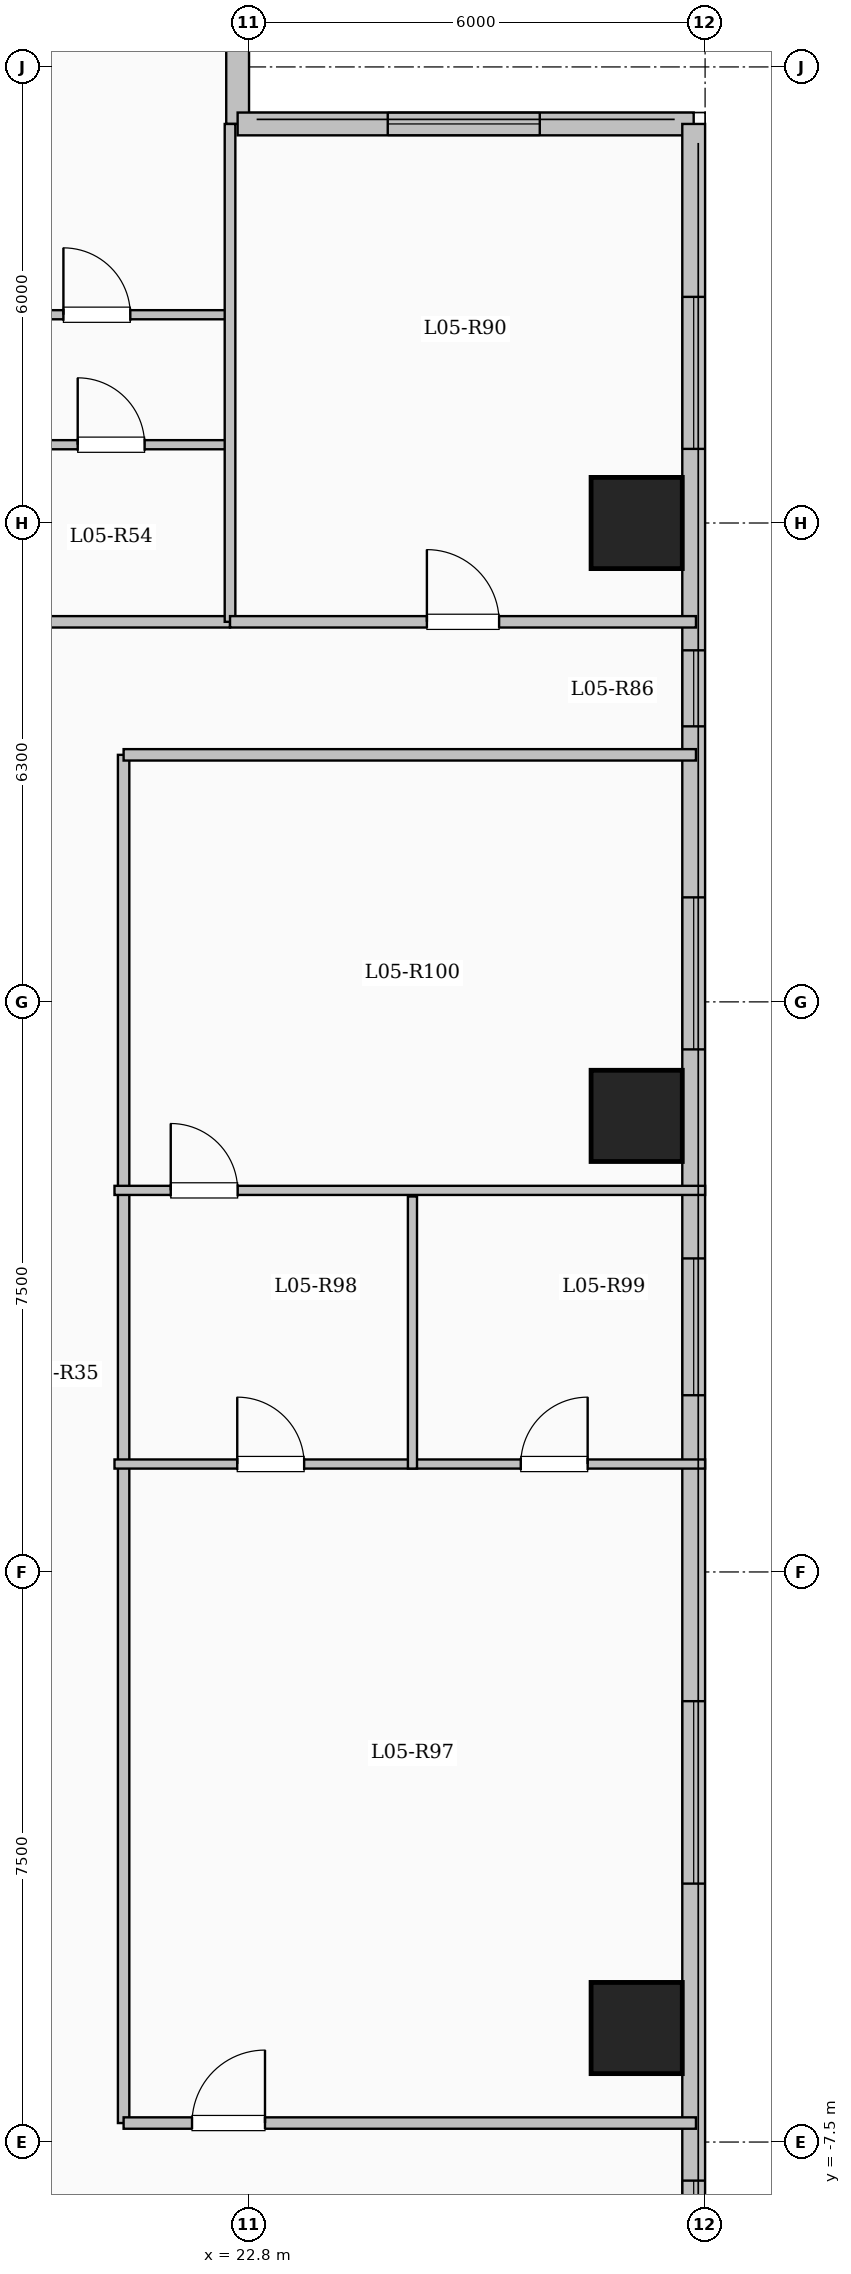
"""IFC4 building model, lengths in metres.
Left out: names, types, materials, properties, quantities, classifications, styles, units other than length and angle.
Written with IfcOpenShell. Run it as: python <this file> out.ifc"""

import sys

from ifc_helpers import new_model, si_unit, direction, frame, frame_2d, origin, origin_2d, place, context, subcontext, project, spatial, rectangle, extrude, element, fill, save


model = new_model("IFC4")
c1 = context("Model", 3, precision=1e-05, world=origin(), true_north=direction((0.0, 1.0)))
c2 = subcontext(c1, "Body", "Model", "MODEL_VIEW")
j1 = project(units=[si_unit("LENGTHUNIT", "METRE"), si_unit("PLANEANGLEUNIT", "RADIAN")], contexts=[c1])
p1 = place(None, origin())
s1 = spatial("IfcSite", under=j1, at=p1, CompositionType="ELEMENT")
p2 = place(p1, origin())
s2 = spatial("IfcBuilding", under=s1, at=p2, CompositionType="ELEMENT")
p3 = place(p2, frame((0.0, 0.0, 24.0)))
s3 = spatial("IfcBuildingStorey", under=s2, at=p3, CompositionType="ELEMENT", Elevation=24.0)
for number, where, z_axis, x_axis in (
    (1, (27.9, -6.0, 0.0), (0.0, 0.0, 1.0), (1.0, 0.0, 0.0)),
    (2, (27.9, 6.0, 0.0), (0.0, 0.0, 1.0), (1.0, 0.0, 0.0)),
    (3, (27.9, 13.8, 0.0), (0.0, 0.0, 1.0), (1.0, 0.0, 0.0)),
):
    element("IfcColumn", number, at=place(p3, frame(where, z_axis=z_axis, x_axis=x_axis)), inside=s3, PredefinedType="COLUMN", context=c2, shape_type="SweptSolid", body=[
        extrude(rectangle(XDim=1.2, YDim=1.2, at=origin_2d()), origin(), (0.0, 0.0, 1.0), 3.35),
    ])
p4 = place(p3, frame((22.65, 23.55, 0.0), z_axis=(0.0, 0.0, 1.0), x_axis=(0.0, -1.0, 0.0)))
e4 = element("IfcWall", 4, at=p4, inside=s3, PredefinedType="SOLIDWALL", context=c2, shape_type="SweptSolid", body=[
    extrude(rectangle(XDim=4.5, YDim=0.3, at=frame_2d((2.25, 0.0))), origin(), (0.0, 0.0, 1.0), 3.1),
])
p5 = place(p4, frame((1.367, 0.0, 0.9)))
e5 = element("IfcOpeningElement", 5, at=p5, cuts=e4, PredefinedType="OPENING", context=c2, shape_type="SweptSolid", body=[
    extrude(rectangle(XDim=1.8, YDim=1.65, at=frame_2d((0.9, 0.825))), frame((0.0, 0.16, 0.0), z_axis=(0.0, -1.0, 0.0), x_axis=(1.0, 0.0, 0.0)), (0.0, 0.0, 1.0), 0.32),
])
p6 = place(p3, frame((22.65, 19.05, 0.0), z_axis=(0.0, 0.0, 1.0), x_axis=(1.0, 0.0, 0.0)))
e6 = element("IfcWall", 6, at=p6, inside=s3, PredefinedType="SOLIDWALL", context=c2, shape_type="SweptSolid", body=[
    extrude(rectangle(XDim=6.0, YDim=0.3, at=frame_2d((3.0, 0.0))), origin(), (0.0, 0.0, 1.0), 3.1),
])
p7 = place(p6, frame((1.975, 0.0, 0.9)))
e7 = element("IfcOpeningElement", 7, at=p7, cuts=e6, PredefinedType="OPENING", context=c2, shape_type="SweptSolid", body=[
    extrude(rectangle(XDim=2.0, YDim=1.7, at=frame_2d((1.0, 0.85))), frame((0.0, 0.16, 0.0), z_axis=(0.0, -1.0, 0.0), x_axis=(1.0, 0.0, 0.0)), (0.0, 0.0, 1.0), 0.32),
])
p8 = place(p3, frame((28.65, 19.05, 0.0), z_axis=(0.0, 0.0, 1.0), x_axis=(0.0, -1.0, 0.0)))
e8 = element("IfcWall", 8, at=p8, inside=s3, PredefinedType="SOLIDWALL", context=c2, shape_type="SweptSolid", body=[
    extrude(rectangle(XDim=38.1, YDim=0.3, at=frame_2d((19.05, 0.0))), origin(), (0.0, 0.0, 1.0), 3.1),
])
p9 = place(p8, frame((2.275, 0.0, 0.9)))
e9 = element("IfcOpeningElement", 9, at=p9, cuts=e8, PredefinedType="OPENING", context=c2, shape_type="SweptSolid", body=[
    extrude(rectangle(XDim=2.0, YDim=1.7, at=frame_2d((1.0, 0.85))), frame((0.0, 0.16, 0.0), z_axis=(0.0, -1.0, 0.0), x_axis=(1.0, 0.0, 0.0)), (0.0, 0.0, 1.0), 0.32),
])
p10 = place(p8, frame((6.925, 0.0, 0.95)))
e10 = element("IfcOpeningElement", 10, at=p10, cuts=e8, PredefinedType="OPENING", context=c2, shape_type="SweptSolid", body=[
    extrude(rectangle(XDim=1.0, YDim=1.5, at=frame_2d((0.5, 0.75))), frame((0.0, 0.16, 0.0), z_axis=(0.0, -1.0, 0.0), x_axis=(1.0, 0.0, 0.0)), (0.0, 0.0, 1.0), 0.32),
])
p11 = place(p8, frame((10.175, 0.0, 0.9)))
e11 = element("IfcOpeningElement", 11, at=p11, cuts=e8, PredefinedType="OPENING", context=c2, shape_type="SweptSolid", body=[
    extrude(rectangle(XDim=2.0, YDim=1.7, at=frame_2d((1.0, 0.85))), frame((0.0, 0.16, 0.0), z_axis=(0.0, -1.0, 0.0), x_axis=(1.0, 0.0, 0.0)), (0.0, 0.0, 1.0), 0.32),
])
p12 = place(p8, frame((14.925, 0.0, 0.9)))
e12 = element("IfcOpeningElement", 12, at=p12, cuts=e8, PredefinedType="OPENING", context=c2, shape_type="SweptSolid", body=[
    extrude(rectangle(XDim=1.8, YDim=1.65, at=frame_2d((0.9, 0.825))), frame((0.0, 0.16, 0.0), z_axis=(0.0, -1.0, 0.0), x_axis=(1.0, 0.0, 0.0)), (0.0, 0.0, 1.0), 0.32),
])
p13 = place(p8, frame((20.75, 0.0, 0.9)))
e13 = element("IfcOpeningElement", 13, at=p13, cuts=e8, PredefinedType="OPENING", context=c2, shape_type="SweptSolid", body=[
    extrude(rectangle(XDim=2.4, YDim=1.8, at=frame_2d((1.2, 0.9))), frame((0.0, 0.16, 0.0), z_axis=(0.0, -1.0, 0.0), x_axis=(1.0, 0.0, 0.0)), (0.0, 0.0, 1.0), 0.32),
])
p14 = place(p8, frame((27.058, 0.0, 0.9)))
e14 = element("IfcOpeningElement", 14, at=p14, cuts=e8, PredefinedType="OPENING", context=c2, shape_type="SweptSolid", body=[
    extrude(rectangle(XDim=1.5, YDim=1.65, at=frame_2d((0.75, 0.825))), frame((0.0, 0.16, 0.0), z_axis=(0.0, -1.0, 0.0), x_axis=(1.0, 0.0, 0.0)), (0.0, 0.0, 1.0), 0.32),
])
p15 = place(p8, frame((32.55, 0.0, 0.9)))
e15 = element("IfcOpeningElement", 15, at=p15, cuts=e8, PredefinedType="OPENING", context=c2, shape_type="SweptSolid", body=[
    extrude(rectangle(XDim=2.4, YDim=1.8, at=frame_2d((1.2, 0.9))), frame((0.0, 0.16, 0.0), z_axis=(0.0, -1.0, 0.0), x_axis=(1.0, 0.0, 0.0)), (0.0, 0.0, 1.0), 0.32),
])
p16 = place(p3, frame((3.85, 12.5, 0.0), z_axis=(0.0, 0.0, 1.0), x_axis=(1.0, 0.0, 0.0)))
e16 = element("IfcWall", 16, at=p16, inside=s3, PredefinedType="PARTITIONING", context=c2, shape_type="SweptSolid", body=[
    extrude(rectangle(XDim=18.7, YDim=0.15, at=frame_2d((9.35, 0.0))), origin(), (0.0, 0.0, 1.0), 3.1),
])
p17 = place(p16, frame((0.7, 0.0, 0.0)))
e17 = element("IfcOpeningElement", 17, at=p17, cuts=e16, PredefinedType="OPENING", context=c2, shape_type="SweptSolid", body=[
    extrude(rectangle(XDim=0.96, YDim=2.15, at=frame_2d((0.48, 1.075))), frame((0.0, 0.085, 0.0), z_axis=(0.0, -1.0, 0.0), x_axis=(1.0, 0.0, 0.0)), (0.0, 0.0, 1.0), 0.17),
])
p18 = place(p16, frame((8.4, 0.0, 0.0)))
e18 = element("IfcOpeningElement", 18, at=p18, cuts=e16, PredefinedType="OPENING", context=c2, shape_type="SweptSolid", body=[
    extrude(rectangle(XDim=0.96, YDim=2.15, at=frame_2d((0.48, 1.075))), frame((0.0, 0.085, 0.0), z_axis=(0.0, -1.0, 0.0), x_axis=(1.0, 0.0, 0.0)), (0.0, 0.0, 1.0), 0.17),
])
p19 = place(p3, frame((21.15, -7.25, 0.0), z_axis=(0.0, 0.0, 1.0), x_axis=(0.0, 1.0, 0.0)))
e19 = element("IfcWall", 19, at=p19, inside=s3, PredefinedType="PARTITIONING", context=c2, shape_type="SweptSolid", body=[
    extrude(rectangle(XDim=18.0, YDim=0.15, at=frame_2d((9.0, 0.0))), origin(), (0.0, 0.0, 1.0), 2.585),
])
p20 = place(p3, frame((19.422, 14.83, 0.0), z_axis=(0.0, 0.0, 1.0), x_axis=(1.0, 0.0, 0.0)))
e20 = element("IfcWall", 20, at=p20, inside=s3, PredefinedType="PARTITIONING", context=c2, shape_type="SweptSolid", body=[
    extrude(rectangle(XDim=3.128, YDim=0.12, at=frame_2d((1.564, 0.0))), origin(), (0.0, 0.0, 1.0), 3.1),
])
p21 = place(p20, frame((1.124, 0.0, 0.0)))
e21 = element("IfcOpeningElement", 21, at=p21, cuts=e20, PredefinedType="OPENING", context=c2, shape_type="SweptSolid", body=[
    extrude(rectangle(XDim=0.88, YDim=2.1, at=frame_2d((0.44, 1.05))), frame((0.0, 0.07, 0.0), z_axis=(0.0, -1.0, 0.0), x_axis=(1.0, 0.0, 0.0)), (0.0, 0.0, 1.0), 0.14),
])
p22 = place(p3, frame((15.902, 16.54, 0.0), z_axis=(0.0, 0.0, 1.0), x_axis=(1.0, 0.0, 0.0)))
e22 = element("IfcWall", 22, at=p22, inside=s3, PredefinedType="PARTITIONING", context=c2, shape_type="SweptSolid", body=[
    extrude(rectangle(XDim=6.708, YDim=0.12, at=frame_2d((3.354, 0.0))), origin(), (0.0, 0.0, 1.0), 3.1),
])
p23 = place(p22, frame((1.192, 0.0, 0.0)))
e23 = element("IfcOpeningElement", 23, at=p23, cuts=e22, PredefinedType="OPENING", context=c2, shape_type="SweptSolid", body=[
    extrude(rectangle(XDim=0.88, YDim=2.1, at=frame_2d((0.44, 1.05))), frame((0.0, 0.07, 0.0), z_axis=(0.0, -1.0, 0.0), x_axis=(1.0, 0.0, 0.0)), (0.0, 0.0, 1.0), 0.14),
])
p24 = place(p22, frame((4.456, 0.0, 0.0)))
e24 = element("IfcOpeningElement", 24, at=p24, cuts=e22, PredefinedType="OPENING", context=c2, shape_type="SweptSolid", body=[
    extrude(rectangle(XDim=0.88, YDim=2.1, at=frame_2d((0.44, 1.05))), frame((0.0, 0.07, 0.0), z_axis=(0.0, -1.0, 0.0), x_axis=(1.0, 0.0, 0.0)), (0.0, 0.0, 1.0), 0.14),
])
p25 = place(p3, frame((21.15, -7.25, 0.0), z_axis=(0.0, 0.0, 1.0), x_axis=(1.0, 0.0, 0.0)))
e25 = element("IfcWall", 25, at=p25, inside=s3, PredefinedType="PARTITIONING", context=c2, shape_type="SweptSolid", body=[
    extrude(rectangle(XDim=7.53, YDim=0.15, at=frame_2d((3.765, 0.0))), origin(), (0.0, 0.0, 1.0), 3.1),
])
p26 = place(p25, frame((0.9, 0.0, 0.0)))
e26 = element("IfcOpeningElement", 26, at=p26, cuts=e25, PredefinedType="OPENING", context=c2, shape_type="SweptSolid", body=[
    extrude(rectangle(XDim=0.96, YDim=2.15, at=frame_2d((0.48, 1.075))), frame((0.0, 0.085, 0.0), z_axis=(0.0, -1.0, 0.0), x_axis=(1.0, 0.0, 0.0)), (0.0, 0.0, 1.0), 0.17),
])
p27 = place(p3, frame((21.15, 10.75, 0.0), z_axis=(0.0, 0.0, 1.0), x_axis=(1.0, 0.0, 0.0)))
e27 = element("IfcWall", 27, at=p27, inside=s3, PredefinedType="PARTITIONING", context=c2, shape_type="SweptSolid", body=[
    extrude(rectangle(XDim=7.53, YDim=0.15, at=frame_2d((3.765, 0.0))), origin(), (0.0, 0.0, 1.0), 3.1),
])
p28 = place(p3, frame((22.55, 12.5, 0.0), z_axis=(0.0, 0.0, 1.0), x_axis=(0.0, 1.0, 0.0)))
e28 = element("IfcWall", 28, at=p28, inside=s3, PredefinedType="PARTITIONING", context=c2, shape_type="SweptSolid", body=[
    extrude(rectangle(XDim=6.55, YDim=0.14, at=frame_2d((3.275, 0.0))), origin(), (0.0, 0.0, 1.0), 3.1),
])
p29 = place(p3, frame((22.55, 12.5, 0.0), z_axis=(0.0, 0.0, 1.0), x_axis=(1.0, 0.0, 0.0)))
e29 = element("IfcWall", 29, at=p29, inside=s3, PredefinedType="PARTITIONING", context=c2, shape_type="SweptSolid", body=[
    extrude(rectangle(XDim=6.13, YDim=0.15, at=frame_2d((3.065, 0.0))), origin(), (0.0, 0.0, 1.0), 3.1),
])
p30 = place(p29, frame((2.59, 0.0, 0.0)))
e30 = element("IfcOpeningElement", 30, at=p30, cuts=e29, PredefinedType="OPENING", context=c2, shape_type="SweptSolid", body=[
    extrude(rectangle(XDim=0.95, YDim=2.15, at=frame_2d((0.475, 1.075))), frame((0.0, 0.085, 0.0), z_axis=(0.0, -1.0, 0.0), x_axis=(1.0, 0.0, 0.0)), (0.0, 0.0, 1.0), 0.17),
])
p31 = place(p3, frame((21.03, 1.42, 0.0), z_axis=(0.0, 0.0, 1.0), x_axis=(1.0, 0.0, 0.0)))
e31 = element("IfcWall", 31, at=p31, inside=s3, PredefinedType="PARTITIONING", context=c2, shape_type="SweptSolid", body=[
    extrude(rectangle(XDim=7.77, YDim=0.12, at=frame_2d((3.885, 0.0))), origin(), (0.0, 0.0, 1.0), 3.1),
])
p32 = place(p31, frame((1.615, 0.0, 0.0)))
e32 = element("IfcOpeningElement", 32, at=p32, cuts=e31, PredefinedType="OPENING", context=c2, shape_type="SweptSolid", body=[
    extrude(rectangle(XDim=0.88, YDim=2.1, at=frame_2d((0.44, 1.05))), frame((0.0, 0.07, 0.0), z_axis=(0.0, -1.0, 0.0), x_axis=(1.0, 0.0, 0.0)), (0.0, 0.0, 1.0), 0.14),
])
p33 = place(p31, frame((5.345, 0.0, 0.0)))
e33 = element("IfcOpeningElement", 33, at=p33, cuts=e31, PredefinedType="OPENING", context=c2, shape_type="SweptSolid", body=[
    extrude(rectangle(XDim=0.88, YDim=2.1, at=frame_2d((0.44, 1.05))), frame((0.0, 0.07, 0.0), z_axis=(0.0, -1.0, 0.0), x_axis=(1.0, 0.0, 0.0)), (0.0, 0.0, 1.0), 0.14),
])
p34 = place(p3, frame((21.03, 5.02, 0.0), z_axis=(0.0, 0.0, 1.0), x_axis=(1.0, 0.0, 0.0)))
e34 = element("IfcWall", 34, at=p34, inside=s3, PredefinedType="PARTITIONING", context=c2, shape_type="SweptSolid", body=[
    extrude(rectangle(XDim=7.77, YDim=0.12, at=frame_2d((3.885, 0.0))), origin(), (0.0, 0.0, 1.0), 3.1),
])
p35 = place(p34, frame((0.74, 0.0, 0.0)))
e35 = element("IfcOpeningElement", 35, at=p35, cuts=e34, PredefinedType="OPENING", context=c2, shape_type="SweptSolid", body=[
    extrude(rectangle(XDim=0.88, YDim=2.1, at=frame_2d((0.44, 1.05))), frame((0.0, 0.07, 0.0), z_axis=(0.0, -1.0, 0.0), x_axis=(1.0, 0.0, 0.0)), (0.0, 0.0, 1.0), 0.14),
])
p36 = place(p3, frame((24.95, 1.36, 0.0), z_axis=(0.0, 0.0, 1.0), x_axis=(0.0, 1.0, 0.0)))
e36 = element("IfcWall", 36, at=p36, inside=s3, PredefinedType="PARTITIONING", context=c2, shape_type="SweptSolid", body=[
    extrude(rectangle(XDim=3.58, YDim=0.12, at=frame_2d((1.79, 0.0))), origin(), (0.0, 0.0, 1.0), 3.1),
])
p37 = place(p7, origin())
e37 = element("IfcWindow", 37, at=p37, inside=s3, PartitioningType="SINGLE_PANEL", PredefinedType="WINDOW", context=c2, shape_type="SweptSolid", body=[
    extrude(rectangle(XDim=2.0, YDim=1.7, at=frame_2d((1.0, 0.85))), frame((0.0, 0.03, 0.0), z_axis=(0.0, -1.0, 0.0), x_axis=(1.0, 0.0, 0.0)), (0.0, 0.0, 1.0), 0.06),
])
fill(e7, e37)
p38 = place(p9, origin())
e38 = element("IfcWindow", 38, at=p38, inside=s3, PartitioningType="SINGLE_PANEL", PredefinedType="WINDOW", context=c2, shape_type="SweptSolid", body=[
    extrude(rectangle(XDim=2.0, YDim=1.7, at=frame_2d((1.0, 0.85))), frame((0.0, 0.03, 0.0), z_axis=(0.0, -1.0, 0.0), x_axis=(1.0, 0.0, 0.0)), (0.0, 0.0, 1.0), 0.06),
])
fill(e9, e38)
p39 = place(p10, origin())
e39 = element("IfcWindow", 39, at=p39, inside=s3, PartitioningType="SINGLE_PANEL", PredefinedType="WINDOW", context=c2, shape_type="SweptSolid", body=[
    extrude(rectangle(XDim=1.0, YDim=1.5, at=frame_2d((0.5, 0.75))), frame((0.0, 0.03, 0.0), z_axis=(0.0, -1.0, 0.0), x_axis=(1.0, 0.0, 0.0)), (0.0, 0.0, 1.0), 0.06),
])
fill(e10, e39)
p40 = place(p11, origin())
e40 = element("IfcWindow", 40, at=p40, inside=s3, PartitioningType="SINGLE_PANEL", PredefinedType="WINDOW", context=c2, shape_type="SweptSolid", body=[
    extrude(rectangle(XDim=2.0, YDim=1.7, at=frame_2d((1.0, 0.85))), frame((0.0, 0.03, 0.0), z_axis=(0.0, -1.0, 0.0), x_axis=(1.0, 0.0, 0.0)), (0.0, 0.0, 1.0), 0.06),
])
fill(e11, e40)
p41 = place(p12, origin())
e41 = element("IfcWindow", 41, at=p41, inside=s3, PartitioningType="SINGLE_PANEL", PredefinedType="WINDOW", context=c2, shape_type="SweptSolid", body=[
    extrude(rectangle(XDim=1.8, YDim=1.65, at=frame_2d((0.9, 0.825))), frame((0.0, 0.03, 0.0), z_axis=(0.0, -1.0, 0.0), x_axis=(1.0, 0.0, 0.0)), (0.0, 0.0, 1.0), 0.06),
])
fill(e12, e41)
p42 = place(p13, origin())
e42 = element("IfcWindow", 42, at=p42, inside=s3, PartitioningType="SINGLE_PANEL", PredefinedType="WINDOW", context=c2, shape_type="SweptSolid", body=[
    extrude(rectangle(XDim=2.4, YDim=1.8, at=frame_2d((1.2, 0.9))), frame((0.0, 0.03, 0.0), z_axis=(0.0, -1.0, 0.0), x_axis=(1.0, 0.0, 0.0)), (0.0, 0.0, 1.0), 0.06),
])
fill(e13, e42)
p43 = place(p14, origin())
e43 = element("IfcWindow", 43, at=p43, inside=s3, PartitioningType="SINGLE_PANEL", PredefinedType="WINDOW", context=c2, shape_type="SweptSolid", body=[
    extrude(rectangle(XDim=1.5, YDim=1.65, at=frame_2d((0.75, 0.825))), frame((0.0, 0.03, 0.0), z_axis=(0.0, -1.0, 0.0), x_axis=(1.0, 0.0, 0.0)), (0.0, 0.0, 1.0), 0.06),
])
fill(e14, e43)
p44 = place(p21, origin())
e44 = element("IfcDoor", 44, at=p44, inside=s3, OperationType="SINGLE_SWING_LEFT", PredefinedType="DOOR", context=c2, shape_type="SweptSolid", body=[
    extrude(rectangle(XDim=0.88, YDim=2.1, at=frame_2d((0.44, 1.05))), frame((0.0, 0.025, 0.0), z_axis=(0.0, -1.0, 0.0), x_axis=(1.0, 0.0, 0.0)), (0.0, 0.0, 1.0), 0.05),
])
fill(e21, e44)
p45 = place(p24, origin())
e45 = element("IfcDoor", 45, at=p45, inside=s3, OperationType="SINGLE_SWING_LEFT", PredefinedType="DOOR", context=c2, shape_type="SweptSolid", body=[
    extrude(rectangle(XDim=0.88, YDim=2.1, at=frame_2d((0.44, 1.05))), frame((0.0, 0.025, 0.0), z_axis=(0.0, -1.0, 0.0), x_axis=(1.0, 0.0, 0.0)), (0.0, 0.0, 1.0), 0.05),
])
fill(e24, e45)
p46 = place(p30, origin())
e46 = element("IfcDoor", 46, at=p46, inside=s3, OperationType="SINGLE_SWING_LEFT", PredefinedType="DOOR", context=c2, shape_type="SweptSolid", body=[
    extrude(rectangle(XDim=0.95, YDim=2.15, at=frame_2d((0.475, 1.075))), frame((0.0, 0.025, 0.0), z_axis=(0.0, -1.0, 0.0), x_axis=(1.0, 0.0, 0.0)), (0.0, 0.0, 1.0), 0.05),
])
fill(e30, e46)
p47 = place(p26, origin())
e47 = element("IfcDoor", 47, at=p47, inside=s3, OperationType="SINGLE_SWING_RIGHT", PredefinedType="DOOR", context=c2, shape_type="SweptSolid", body=[
    extrude(rectangle(XDim=0.96, YDim=2.15, at=frame_2d((0.48, 1.075))), frame((0.0, 0.025, 0.0), z_axis=(0.0, -1.0, 0.0), x_axis=(1.0, 0.0, 0.0)), (0.0, 0.0, 1.0), 0.05),
])
fill(e26, e47)
p48 = place(p32, origin())
e48 = element("IfcDoor", 48, at=p48, inside=s3, OperationType="SINGLE_SWING_LEFT", PredefinedType="DOOR", context=c2, shape_type="SweptSolid", body=[
    extrude(rectangle(XDim=0.88, YDim=2.1, at=frame_2d((0.44, 1.05))), frame((0.0, 0.025, 0.0), z_axis=(0.0, -1.0, 0.0), x_axis=(1.0, 0.0, 0.0)), (0.0, 0.0, 1.0), 0.05),
])
fill(e32, e48)
p49 = place(p33, origin())
e49 = element("IfcDoor", 49, at=p49, inside=s3, OperationType="SINGLE_SWING_RIGHT", PredefinedType="DOOR", context=c2, shape_type="SweptSolid", body=[
    extrude(rectangle(XDim=0.88, YDim=2.1, at=frame_2d((0.44, 1.05))), frame((0.0, 0.025, 0.0), z_axis=(0.0, -1.0, 0.0), x_axis=(1.0, 0.0, 0.0)), (0.0, 0.0, 1.0), 0.05),
])
fill(e33, e49)
p50 = place(p35, origin())
e50 = element("IfcDoor", 50, at=p50, inside=s3, OperationType="SINGLE_SWING_LEFT", PredefinedType="DOOR", context=c2, shape_type="SweptSolid", body=[
    extrude(rectangle(XDim=0.88, YDim=2.1, at=frame_2d((0.44, 1.05))), frame((0.0, 0.025, 0.0), z_axis=(0.0, -1.0, 0.0), x_axis=(1.0, 0.0, 0.0)), (0.0, 0.0, 1.0), 0.05),
])
fill(e35, e50)
save(model, sys.argv[1])
